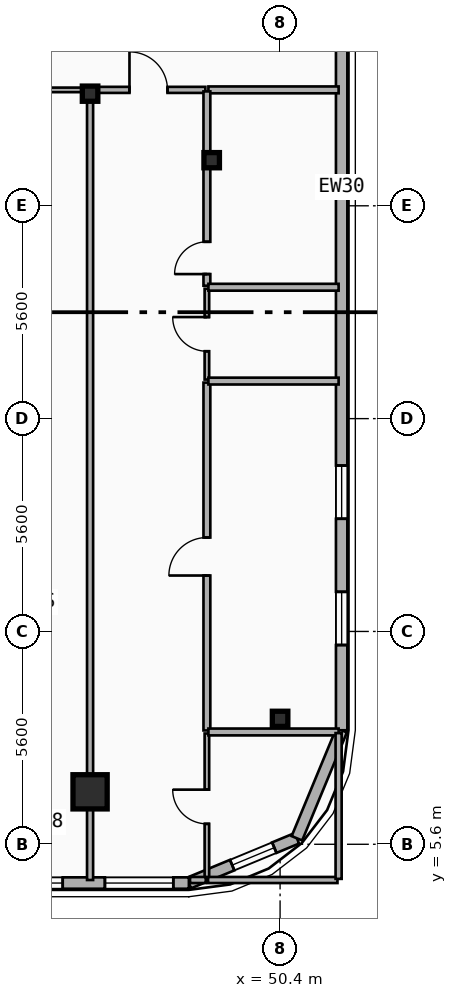
"""IFC4 building model, lengths in metres.
Left out: names, types, materials, properties, quantities, classifications, styles, units other than length and angle.
Written with IfcOpenShell. Run it as: python <this file> out.ifc"""

import sys

from ifc_helpers import new_model, si_unit, direction, frame, frame_2d, origin, origin_2d, place, context, subcontext, project, spatial, rectangle, i_section, extrude, element, fill, save


model = new_model("IFC4")
c1 = context("Model", 3, precision=1e-05, world=origin(), true_north=direction((0.0, 1.0)))
c2 = subcontext(c1, "Body", "Model", "MODEL_VIEW")
j1 = project(units=[si_unit("LENGTHUNIT", "METRE"), si_unit("PLANEANGLEUNIT", "RADIAN")], contexts=[c1])
p1 = place(None, origin())
s1 = spatial("IfcSite", under=j1, at=p1, CompositionType="ELEMENT")
p2 = place(p1, origin())
s2 = spatial("IfcBuilding", under=s1, at=p2, CompositionType="ELEMENT")
p3 = place(p2, frame((0.0, 0.0, 211.2)))
s3 = spatial("IfcBuildingStorey", under=s2, at=p3, CompositionType="ELEMENT", Elevation=211.2)
p4 = place(p3, frame((45.4, 25.35, 0.0), z_axis=(0.0, 0.0, 1.0), x_axis=(1.0, 0.0, 0.0)))
e1 = element("IfcColumn", 1, at=p4, inside=s3, PredefinedType="COLUMN", context=c2, shape_type="SweptSolid", body=[
    extrude(i_section(OverallWidth=0.408, OverallDepth=0.4, WebThickness=0.025, FlangeThickness=0.039, FilletRadius=0.015, at=origin_2d()), origin(), (0.0, 0.0, 1.0), 3.6),
])
p5 = place(p3, frame((45.4, 7.089, 0.0), z_axis=(0.0, -0.090298253426, 0.995914768154), x_axis=(1.0, 0.0, 0.0)))
e2 = element("IfcColumn", 2, at=p5, inside=s3, PredefinedType="COLUMN", context=c2, shape_type="SweptSolid", body=[
    extrude(rectangle(XDim=0.9, YDim=0.9, at=origin_2d()), origin(), (0.0, 0.0, 1.0), 3.615),
])
p6 = place(p3, frame((48.6, 23.6, 0.0), z_axis=(0.0, 0.0, 1.0), x_axis=(1.0, 0.0, 0.0)))
e3 = element("IfcColumn", 3, at=p6, inside=s3, PredefinedType="COLUMN", context=c2, shape_type="SweptSolid", body=[
    extrude(i_section(OverallWidth=0.408, OverallDepth=0.4, WebThickness=0.025, FlangeThickness=0.039, FilletRadius=0.015, at=origin_2d()), origin(), (0.0, 0.0, 1.0), 3.6),
])
p7 = place(p3, frame((50.4, 8.997, 0.0), z_axis=(0.0, -0.079901051777, 0.996802799918), x_axis=(1.0, 0.0, 0.0)))
e4 = element("IfcColumn", 4, at=p7, inside=s3, PredefinedType="COLUMN", context=c2, shape_type="SweptSolid", body=[
    extrude(i_section(OverallWidth=0.408, OverallDepth=0.4, WebThickness=0.025, FlangeThickness=0.039, FilletRadius=0.015, at=origin_2d()), origin(), (0.0, 0.0, 1.0), 3.612),
])
p8 = place(p3, frame((50.843, 5.757, 0.0), z_axis=(0.0, 0.0, 1.0), x_axis=(-0.92389884758, -0.382636798336, 0.0)))
e5 = element("IfcWall", 5, at=p8, inside=s3, PredefinedType="SOLIDWALL", context=c2, shape_type="SweptSolid", body=[
    extrude(rectangle(XDim=3.077, YDim=0.3, at=frame_2d((1.538, 0.0))), origin(), (0.0, 0.0, 1.0), 3.34),
])
p9 = place(p8, frame((0.644, 0.0, 0.75)))
e6 = element("IfcOpeningElement", 6, at=p9, cuts=e5, PredefinedType="OPENING", context=c2, shape_type="SweptSolid", body=[
    extrude(rectangle(XDim=1.2, YDim=1.5, at=frame_2d((0.6, 0.75))), frame((0.0, 0.16, 0.0), z_axis=(0.0, -1.0, 0.0), x_axis=(1.0, 0.0, 0.0)), (0.0, 0.0, 1.0), 0.32),
])
p10 = place(p3, frame((52.02, 8.6, 0.0), z_axis=(0.0, 0.0, 1.0), x_axis=(-0.382676475685, -0.923882414032, 0.0)))
e7 = element("IfcWall", 7, at=p10, inside=s3, PredefinedType="SOLIDWALL", context=c2, shape_type="SweptSolid", body=[
    extrude(rectangle(XDim=3.077, YDim=0.3, at=frame_2d((1.539, 0.0))), origin(), (0.0, 0.0, 1.0), 3.34),
])
p11 = place(p3, frame((52.02, 37.2, 0.0), z_axis=(0.0, 0.0, 1.0), x_axis=(0.0, -1.0, 0.0)))
e8 = element("IfcWall", 8, at=p11, inside=s3, PredefinedType="SOLIDWALL", context=c2, shape_type="SweptSolid", body=[
    extrude(rectangle(XDim=28.6, YDim=0.3, at=frame_2d((14.3, 0.0))), origin(), (0.0, 0.0, 1.0), 3.34),
])
p12 = place(p11, frame((2.38, 0.0, 0.34)))
e9 = element("IfcOpeningElement", 9, at=p12, cuts=e8, PredefinedType="OPENING", context=c2, shape_type="SweptSolid", body=[
    extrude(rectangle(XDim=1.4, YDim=2.1, at=frame_2d((0.7, 1.05))), frame((0.0, 0.16, 0.0), z_axis=(0.0, -1.0, 0.0), x_axis=(1.0, 0.0, 0.0)), (0.0, 0.0, 1.0), 0.32),
])
p13 = place(p11, frame((5.84, 0.0, 0.34)))
e10 = element("IfcOpeningElement", 10, at=p13, cuts=e8, PredefinedType="OPENING", context=c2, shape_type="SweptSolid", body=[
    extrude(rectangle(XDim=1.4, YDim=2.1, at=frame_2d((0.7, 1.05))), frame((0.0, 0.16, 0.0), z_axis=(0.0, -1.0, 0.0), x_axis=(1.0, 0.0, 0.0)), (0.0, 0.0, 1.0), 0.32),
])
p14 = place(p11, frame((21.635, 0.0, 0.34)))
e11 = element("IfcOpeningElement", 11, at=p14, cuts=e8, PredefinedType="OPENING", context=c2, shape_type="SweptSolid", body=[
    extrude(rectangle(XDim=1.4, YDim=2.1, at=frame_2d((0.7, 1.05))), frame((0.0, 0.16, 0.0), z_axis=(0.0, -1.0, 0.0), x_axis=(1.0, 0.0, 0.0)), (0.0, 0.0, 1.0), 0.32),
])
p15 = place(p11, frame((24.957, 0.0, 0.34)))
e12 = element("IfcOpeningElement", 12, at=p15, cuts=e8, PredefinedType="OPENING", context=c2, shape_type="SweptSolid", body=[
    extrude(rectangle(XDim=1.4, YDim=2.1, at=frame_2d((0.7, 1.05))), frame((0.0, 0.16, 0.0), z_axis=(0.0, -1.0, 0.0), x_axis=(1.0, 0.0, 0.0)), (0.0, 0.0, 1.0), 0.32),
])
p16 = place(p3, frame((48.0, 4.58, 0.0), z_axis=(0.0, 0.0, 1.0), x_axis=(-1.0, 0.0, 0.0)))
e13 = element("IfcWall", 13, at=p16, inside=s3, PredefinedType="SOLIDWALL", context=c2, shape_type="SweptSolid", body=[
    extrude(rectangle(XDim=38.4, YDim=0.3, at=frame_2d((19.2, 0.0))), origin(), (0.0, 0.0, 1.0), 3.34),
])
p17 = place(p16, frame((33.709, 0.0, 0.34)))
e14 = element("IfcOpeningElement", 14, at=p17, cuts=e13, PredefinedType="OPENING", context=c2, shape_type="SweptSolid", body=[
    extrude(rectangle(XDim=1.4, YDim=1.8, at=frame_2d((0.7, 0.9))), frame((0.0, 0.16, 0.0), z_axis=(0.0, -1.0, 0.0), x_axis=(1.0, 0.0, 0.0)), (0.0, 0.0, 1.0), 0.32),
])
p18 = place(p16, frame((29.45, 0.0, 1.85)))
e15 = element("IfcOpeningElement", 15, at=p18, cuts=e13, PredefinedType="OPENING", context=c2, shape_type="SweptSolid", body=[
    extrude(rectangle(XDim=1.1, YDim=0.9, at=frame_2d((0.55, 0.45))), frame((0.0, 0.16, 0.0), z_axis=(0.0, -1.0, 0.0), x_axis=(1.0, 0.0, 0.0)), (0.0, 0.0, 1.0), 0.32),
])
p19 = place(p16, frame((35.994, 0.0, 0.48)))
e16 = element("IfcOpeningElement", 16, at=p19, cuts=e13, PredefinedType="OPENING", context=c2, shape_type="SweptSolid", body=[
    extrude(rectangle(XDim=1.8, YDim=1.8, at=frame_2d((0.9, 0.9))), frame((0.0, 0.16, 0.0), z_axis=(0.0, -1.0, 0.0), x_axis=(1.0, 0.0, 0.0)), (0.0, 0.0, 1.0), 0.32),
])
p20 = place(p16, frame((13.014, 0.0, 0.65)))
e17 = element("IfcOpeningElement", 17, at=p20, cuts=e13, PredefinedType="OPENING", context=c2, shape_type="SweptSolid", body=[
    extrude(rectangle(XDim=2.0, YDim=2.2, at=frame_2d((1.0, 1.1))), frame((0.0, 0.16, 0.0), z_axis=(0.0, -1.0, 0.0), x_axis=(1.0, 0.0, 0.0)), (0.0, 0.0, 1.0), 0.32),
])
p21 = place(p16, frame((3.32, 0.0, 1.05)))
e18 = element("IfcOpeningElement", 18, at=p21, cuts=e13, PredefinedType="OPENING", context=c2, shape_type="SweptSolid", body=[
    extrude(rectangle(XDim=1.2, YDim=1.5, at=frame_2d((0.6, 0.75))), frame((0.0, 0.16, 0.0), z_axis=(0.0, -1.0, 0.0), x_axis=(1.0, 0.0, 0.0)), (0.0, 0.0, 1.0), 0.32),
])
p22 = place(p16, frame((0.41, 0.0, 0.48)))
e19 = element("IfcOpeningElement", 19, at=p22, cuts=e13, PredefinedType="OPENING", context=c2, shape_type="SweptSolid", body=[
    extrude(rectangle(XDim=1.8, YDim=1.8, at=frame_2d((0.9, 0.9))), frame((0.0, 0.16, 0.0), z_axis=(0.0, -1.0, 0.0), x_axis=(1.0, 0.0, 0.0)), (0.0, 0.0, 1.0), 0.32),
])
p23 = place(p3, frame((38.39, 25.45, 0.0), z_axis=(0.0, 0.0, 1.0), x_axis=(1.0, 0.0, 0.0)))
e20 = element("IfcWall", 20, at=p23, inside=s3, PredefinedType="PARTITIONING", context=c2, shape_type="SweptSolid", body=[
    extrude(rectangle(XDim=6.97, YDim=0.12, at=frame_2d((3.485, 0.0))), origin(), (0.0, 0.0, 1.0), 2.52),
])
p24 = place(p23, frame((3.035, 0.0, 0.0)))
e21 = element("IfcOpeningElement", 21, at=p24, cuts=e20, PredefinedType="OPENING", context=c2, shape_type="SweptSolid", body=[
    extrude(rectangle(XDim=0.9, YDim=2.1, at=frame_2d((0.45, 1.05))), frame((0.0, 0.07, 0.0), z_axis=(0.0, -1.0, 0.0), x_axis=(1.0, 0.0, 0.0)), (0.0, 0.0, 1.0), 0.14),
])
p25 = place(p3, frame((45.44, 25.45, 0.0), z_axis=(0.0, 0.0, 1.0), x_axis=(1.0, 0.0, 0.0)))
e22 = element("IfcWall", 22, at=p25, inside=s3, PredefinedType="PARTITIONING", context=c2, shape_type="SweptSolid", body=[
    extrude(rectangle(XDim=2.994, YDim=0.16, at=frame_2d((1.497, 0.0))), origin(), (0.0, 0.0, 1.0), 2.52),
])
p26 = place(p25, frame((0.997, 0.0, 0.0)))
e23 = element("IfcOpeningElement", 23, at=p26, cuts=e22, PredefinedType="OPENING", context=c2, shape_type="SweptSolid", body=[
    extrude(rectangle(XDim=1.0, YDim=2.15, at=frame_2d((0.5, 1.075))), frame((0.0, 0.09, 0.0), z_axis=(0.0, -1.0, 0.0), x_axis=(1.0, 0.0, 0.0)), (0.0, 0.0, 1.0), 0.18),
])
p27 = place(p3, frame((48.514, 25.45, 0.0), z_axis=(0.0, 0.0, 1.0), x_axis=(1.0, 0.0, 0.0)))
e24 = element("IfcWall", 24, at=p27, inside=s3, PredefinedType="PLUMBINGWALL", context=c2, shape_type="SweptSolid", body=[
    extrude(rectangle(XDim=3.426, YDim=0.18, at=frame_2d((1.713, 0.0))), origin(), (0.0, 0.0, 1.0), 2.67),
])
p28 = place(p3, frame((45.4, 4.66, 0.0), z_axis=(0.0, 0.0, 1.0), x_axis=(0.0, 1.0, 0.0)))
e25 = element("IfcWall", 25, at=p28, inside=s3, PredefinedType="PARTITIONING", context=c2, shape_type="SweptSolid", body=[
    extrude(rectangle(XDim=20.75, YDim=0.16, at=frame_2d((10.375, 0.0))), origin(), (0.0, 0.0, 1.0), 2.52),
])
p29 = place(p3, frame((48.474, 4.66, 0.0), z_axis=(0.0, 0.0, 1.0), x_axis=(0.0, 1.0, 0.0)))
e26 = element("IfcWall", 26, at=p29, inside=s3, PredefinedType="PARTITIONING", context=c2, shape_type="SweptSolid", body=[
    extrude(rectangle(XDim=3.855, YDim=0.12, at=frame_2d((1.927, 0.0))), origin(), (0.0, 0.0, 1.0), 2.82),
])
p30 = place(p29, frame((1.478, 0.0, 0.0)))
e27 = element("IfcOpeningElement", 27, at=p30, cuts=e26, PredefinedType="OPENING", context=c2, shape_type="SweptSolid", body=[
    extrude(rectangle(XDim=0.9, YDim=2.1, at=frame_2d((0.45, 1.05))), frame((0.0, 0.07, 0.0), z_axis=(0.0, -1.0, 0.0), x_axis=(1.0, 0.0, 0.0)), (0.0, 0.0, 1.0), 0.14),
])
p31 = place(p3, frame((48.474, 8.595, 0.0), z_axis=(0.0, 0.0, 1.0), x_axis=(0.0, 1.0, 0.0)))
e28 = element("IfcWall", 28, at=p31, inside=s3, PredefinedType="PLUMBINGWALL", context=c2, shape_type="SweptSolid", body=[
    extrude(rectangle(XDim=9.153, YDim=0.18, at=frame_2d((4.577, 0.0))), origin(), (0.0, 0.0, 1.0), 2.82),
])
p32 = place(p31, frame((4.076, 0.0, 0.0)))
e29 = element("IfcOpeningElement", 29, at=p32, cuts=e28, PredefinedType="OPENING", context=c2, shape_type="SweptSolid", body=[
    extrude(rectangle(XDim=1.0, YDim=2.15, at=frame_2d((0.5, 1.075))), frame((0.0, 0.1, 0.0), z_axis=(0.0, -1.0, 0.0), x_axis=(1.0, 0.0, 0.0)), (0.0, 0.0, 1.0), 0.2),
])
p33 = place(p3, frame((48.474, 17.828, 0.0), z_axis=(0.0, 0.0, 1.0), x_axis=(0.0, 1.0, 0.0)))
e30 = element("IfcWall", 30, at=p33, inside=s3, PredefinedType="PARTITIONING", context=c2, shape_type="SweptSolid", body=[
    extrude(rectangle(XDim=2.389, YDim=0.12, at=frame_2d((1.195, 0.0))), origin(), (0.0, 0.0, 1.0), 2.82),
])
p34 = place(p33, frame((0.744, 0.0, 0.0)))
e31 = element("IfcOpeningElement", 31, at=p34, cuts=e30, PredefinedType="OPENING", context=c2, shape_type="SweptSolid", body=[
    extrude(rectangle(XDim=0.9, YDim=2.1, at=frame_2d((0.45, 1.05))), frame((0.0, 0.07, 0.0), z_axis=(0.0, -1.0, 0.0), x_axis=(1.0, 0.0, 0.0)), (0.0, 0.0, 1.0), 0.14),
])
p35 = place(p3, frame((48.474, 20.297, 0.0), z_axis=(0.0, 0.0, 1.0), x_axis=(0.0, 1.0, 0.0)))
e32 = element("IfcWall", 32, at=p35, inside=s3, PredefinedType="PLUMBINGWALL", context=c2, shape_type="SweptSolid", body=[
    extrude(rectangle(XDim=5.113, YDim=0.18, at=frame_2d((2.556, 0.0))), origin(), (0.0, 0.0, 1.0), 2.82),
])
p36 = place(p35, frame((0.306, 0.0, 0.0)))
e33 = element("IfcOpeningElement", 33, at=p36, cuts=e32, PredefinedType="OPENING", context=c2, shape_type="SweptSolid", body=[
    extrude(rectangle(XDim=0.85, YDim=2.1, at=frame_2d((0.425, 1.05))), frame((0.0, 0.1, 0.0), z_axis=(0.0, -1.0, 0.0), x_axis=(1.0, 0.0, 0.0)), (0.0, 0.0, 1.0), 0.2),
])
for number, where, z_axis, x_axis in (
    (34, (48.514, 8.555, 0.0), (0.0, 0.0, 1.0), (1.0, 0.0, 0.0)),
    (35, (48.514, 17.788, 0.0), (0.0, 0.0, 1.0), (1.0, 0.0, 0.0)),
    (36, (48.514, 20.257, 0.0), (0.0, 0.0, 1.0), (1.0, 0.0, 0.0)),
):
    element("IfcWall", number, at=place(p3, frame(where, z_axis=z_axis, x_axis=x_axis)), inside=s3, PredefinedType="PLUMBINGWALL", context=c2, shape_type="SweptSolid", body=[
        extrude(rectangle(XDim=3.426, YDim=0.18, at=frame_2d((1.713, 0.0))), origin(), (0.0, 0.0, 1.0), 2.67),
    ])
p37 = place(p3, frame((48.03, 4.66, 0.0), z_axis=(0.0, 0.0, 1.0), x_axis=(1.0, 0.0, 0.0)))
e37 = element("IfcWall", 37, at=p37, inside=s3, PredefinedType="PARTITIONING", context=c2, shape_type="SweptSolid", body=[
    extrude(rectangle(XDim=0.414, YDim=0.16, at=frame_2d((0.207, 0.0))), origin(), (0.0, 0.0, 1.0), 3.34),
])
p38 = place(p3, frame((48.504, 4.66, 0.0), z_axis=(0.0, 0.0, 1.0), x_axis=(1.0, 0.0, 0.0)))
e38 = element("IfcWall", 38, at=p38, inside=s3, PredefinedType="PARTITIONING", context=c2, shape_type="SweptSolid", body=[
    extrude(rectangle(XDim=3.406, YDim=0.16, at=frame_2d((1.703, 0.0))), origin(), (0.0, 0.0, 1.0), 3.34),
])
p39 = place(p3, frame((51.94, 4.69, 0.0), z_axis=(0.0, 0.0, 1.0), x_axis=(0.0, 1.0, 0.0)))
e39 = element("IfcWall", 39, at=p39, inside=s3, PredefinedType="PARTITIONING", context=c2, shape_type="SweptSolid", body=[
    extrude(rectangle(XDim=3.835, YDim=0.16, at=frame_2d((1.917, 0.0))), origin(), (0.0, 0.0, 1.0), 3.34),
])
p40 = place(p14, origin())
e40 = element("IfcWindow", 40, at=p40, inside=s3, PartitioningType="SINGLE_PANEL", PredefinedType="WINDOW", context=c2, shape_type="SweptSolid", body=[
    extrude(rectangle(XDim=1.4, YDim=2.1, at=frame_2d((0.7, 1.05))), frame((0.0, 0.03, 0.0), z_axis=(0.0, -1.0, 0.0), x_axis=(1.0, 0.0, 0.0)), (0.0, 0.0, 1.0), 0.06),
])
fill(e11, e40)
p41 = place(p15, origin())
e41 = element("IfcWindow", 41, at=p41, inside=s3, PartitioningType="SINGLE_PANEL", PredefinedType="WINDOW", context=c2, shape_type="SweptSolid", body=[
    extrude(rectangle(XDim=1.4, YDim=2.1, at=frame_2d((0.7, 1.05))), frame((0.0, 0.03, 0.0), z_axis=(0.0, -1.0, 0.0), x_axis=(1.0, 0.0, 0.0)), (0.0, 0.0, 1.0), 0.06),
])
fill(e12, e41)
p42 = place(p21, origin())
e42 = element("IfcWindow", 42, at=p42, inside=s3, PartitioningType="SINGLE_PANEL", PredefinedType="WINDOW", context=c2, shape_type="SweptSolid", body=[
    extrude(rectangle(XDim=1.2, YDim=1.5, at=frame_2d((0.6, 0.75))), frame((0.0, 0.03, 0.0), z_axis=(0.0, -1.0, 0.0), x_axis=(1.0, 0.0, 0.0)), (0.0, 0.0, 1.0), 0.06),
])
fill(e18, e42)
p43 = place(p22, origin())
e43 = element("IfcWindow", 43, at=p43, inside=s3, PartitioningType="SINGLE_PANEL", PredefinedType="WINDOW", context=c2, shape_type="SweptSolid", body=[
    extrude(rectangle(XDim=1.8, YDim=1.8, at=frame_2d((0.9, 0.9))), frame((0.0, 0.03, 0.0), z_axis=(0.0, -1.0, 0.0), x_axis=(1.0, 0.0, 0.0)), (0.0, 0.0, 1.0), 0.06),
])
fill(e19, e43)
p44 = place(p9, origin())
e44 = element("IfcWindow", 44, at=p44, inside=s3, PartitioningType="SINGLE_PANEL", PredefinedType="WINDOW", context=c2, shape_type="SweptSolid", body=[
    extrude(rectangle(XDim=1.2, YDim=1.5, at=frame_2d((0.6, 0.75))), frame((0.0, 0.03, 0.0), z_axis=(0.0, -1.0, 0.0), x_axis=(1.0, 0.0, 0.0)), (0.0, 0.0, 1.0), 0.06),
])
fill(e6, e44)
p45 = place(p26, origin())
e45 = element("IfcDoor", 45, at=p45, inside=s3, OperationType="SINGLE_SWING_LEFT", PredefinedType="DOOR", context=c2, shape_type="SweptSolid", body=[
    extrude(rectangle(XDim=1.0, YDim=2.15, at=frame_2d((0.5, 1.075))), frame((0.0, 0.025, 0.0), z_axis=(0.0, -1.0, 0.0), x_axis=(1.0, 0.0, 0.0)), (0.0, 0.0, 1.0), 0.05),
])
fill(e23, e45)
p46 = place(p30, origin())
e46 = element("IfcDoor", 46, at=p46, inside=s3, OperationType="SINGLE_SWING_RIGHT", PredefinedType="DOOR", context=c2, shape_type="SweptSolid", body=[
    extrude(rectangle(XDim=0.9, YDim=2.1, at=frame_2d((0.45, 1.05))), frame((0.0, 0.025, 0.0), z_axis=(0.0, -1.0, 0.0), x_axis=(1.0, 0.0, 0.0)), (0.0, 0.0, 1.0), 0.05),
])
fill(e27, e46)
p47 = place(p32, origin())
e47 = element("IfcDoor", 47, at=p47, inside=s3, OperationType="SINGLE_SWING_LEFT", PredefinedType="DOOR", context=c2, shape_type="SweptSolid", body=[
    extrude(rectangle(XDim=1.0, YDim=2.15, at=frame_2d((0.5, 1.075))), frame((0.0, 0.025, 0.0), z_axis=(0.0, -1.0, 0.0), x_axis=(1.0, 0.0, 0.0)), (0.0, 0.0, 1.0), 0.05),
])
fill(e29, e47)
p48 = place(p34, origin())
e48 = element("IfcDoor", 48, at=p48, inside=s3, OperationType="SINGLE_SWING_RIGHT", PredefinedType="DOOR", context=c2, shape_type="SweptSolid", body=[
    extrude(rectangle(XDim=0.9, YDim=2.1, at=frame_2d((0.45, 1.05))), frame((0.0, 0.025, 0.0), z_axis=(0.0, -1.0, 0.0), x_axis=(1.0, 0.0, 0.0)), (0.0, 0.0, 1.0), 0.05),
])
fill(e31, e48)
p49 = place(p36, origin())
e49 = element("IfcDoor", 49, at=p49, inside=s3, OperationType="SINGLE_SWING_LEFT", PredefinedType="DOOR", context=c2, shape_type="SweptSolid", body=[
    extrude(rectangle(XDim=0.85, YDim=2.1, at=frame_2d((0.425, 1.05))), frame((0.0, 0.025, 0.0), z_axis=(0.0, -1.0, 0.0), x_axis=(1.0, 0.0, 0.0)), (0.0, 0.0, 1.0), 0.05),
])
fill(e33, e49)
save(model, sys.argv[1])
